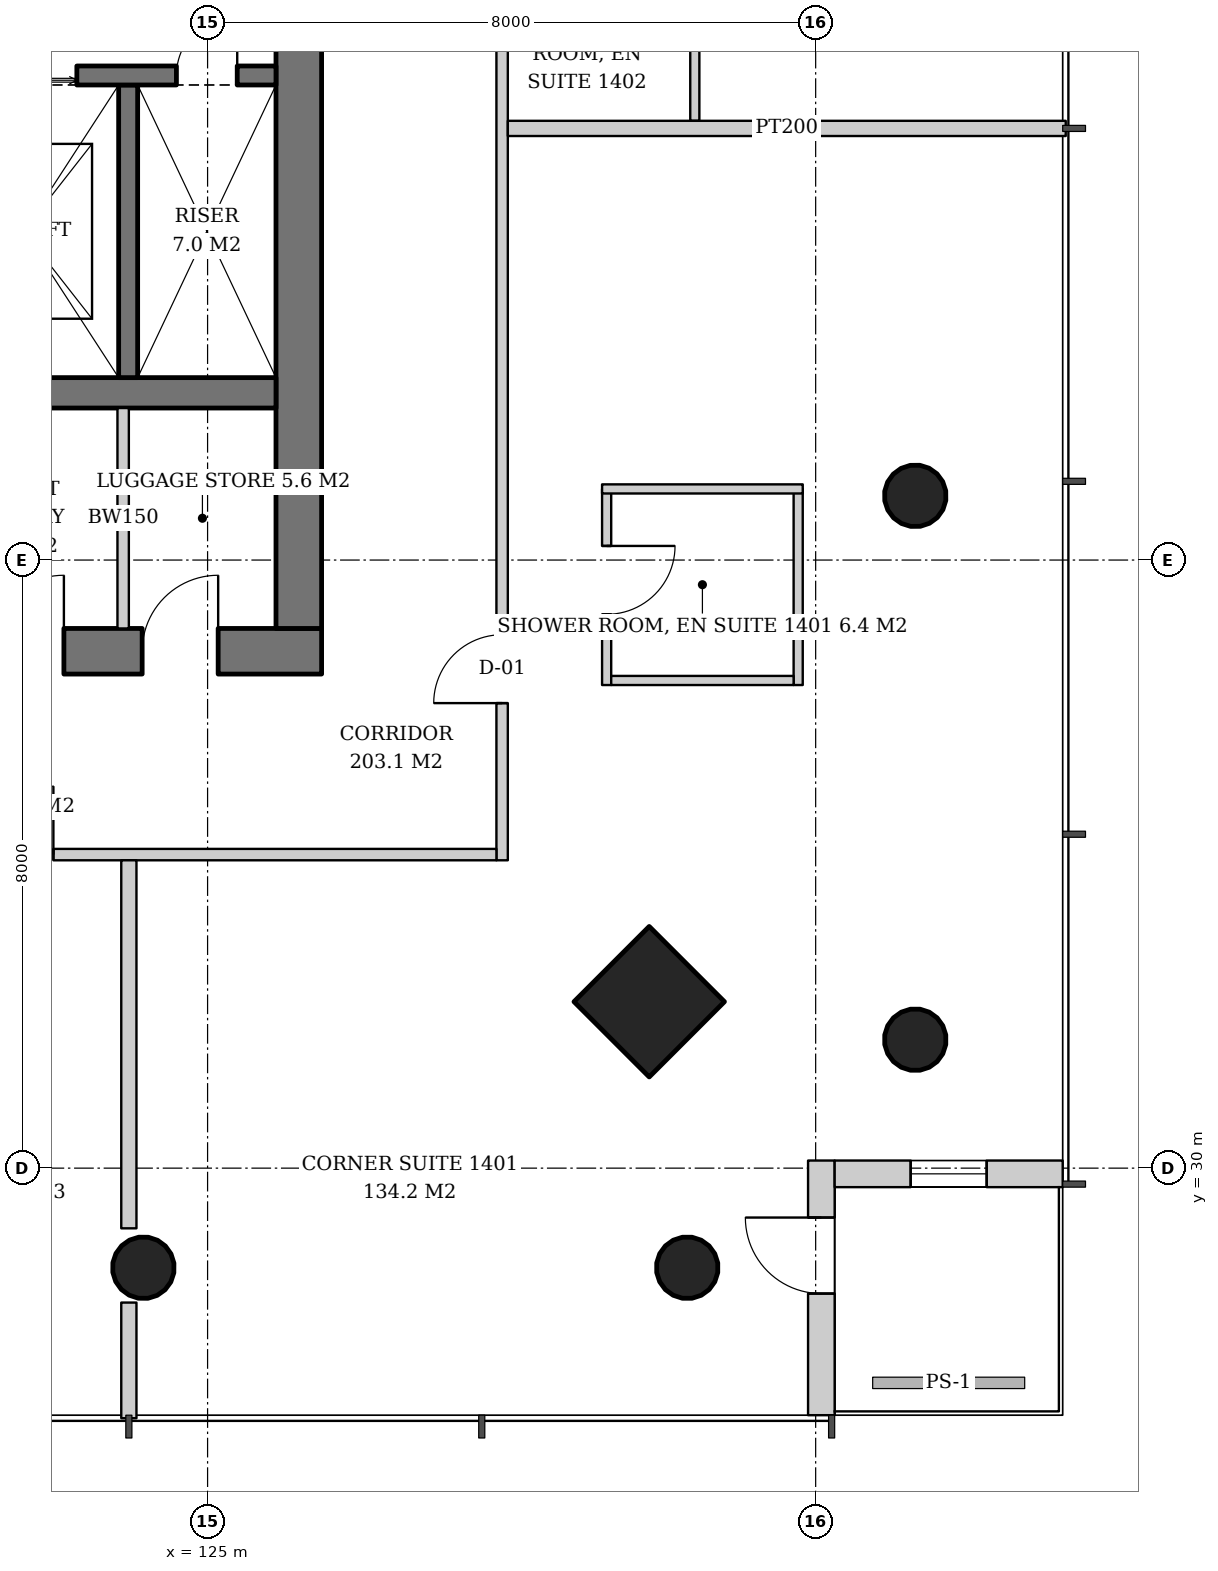
"""IFC4 building model, lengths in metres.
Left out: names, types, materials, properties, quantities, classifications, styles, units other than length and angle.
Written with IfcOpenShell. Run it as: python <this file> out.ifc"""

import sys

from ifc_helpers import new_model, si_unit, direction, frame, frame_2d, origin, origin_2d, place, context, subcontext, project, spatial, rectangle, hollow_circle, extrude, element, fill, save


model = new_model("IFC4")
c1 = context("Model", 3, precision=1e-05, world=origin(), true_north=direction((0.0, 1.0)))
c2 = subcontext(c1, "Body", "Model", "MODEL_VIEW")
j1 = project(units=[si_unit("LENGTHUNIT", "METRE"), si_unit("PLANEANGLEUNIT", "RADIAN")], contexts=[c1])
p1 = place(None, origin())
s1 = spatial("IfcSite", under=j1, at=p1, CompositionType="ELEMENT")
p2 = place(p1, origin())
s2 = spatial("IfcBuilding", under=s1, at=p2, CompositionType="ELEMENT")
p3 = place(p2, frame((0.0, 0.0, 59.0)))
s3 = spatial("IfcBuildingStorey", under=s2, at=p3, CompositionType="ELEMENT", Elevation=59.0)
p4 = place(p3, frame((134.362, 31.638, 0.0), z_axis=(-0.043029647111, 0.043029647111, 0.998146732169), x_axis=(-0.707106781187, -0.707106781187, 0.0)))
e1 = element("IfcColumn", 1, at=p4, inside=s3, PredefinedType="COLUMN", context=c2, shape_type="SweptSolid", body=[
    extrude(hollow_circle(Radius=0.406, WallThickness=0.03, at=origin_2d()), origin(), (0.0, 0.0, 1.0), 3.807),
])
p5 = place(p3, frame((134.362, 38.819, 0.0), z_axis=(-0.043059525333, 0.021561848751, 0.998839808957), x_axis=(-0.44774654769, -0.894160516368, 0.0)))
e2 = element("IfcColumn", 2, at=p5, inside=s3, PredefinedType="COLUMN", context=c2, shape_type="SweptSolid", body=[
    extrude(hollow_circle(Radius=0.406, WallThickness=0.03, at=origin_2d()), origin(), (0.0, 0.0, 1.0), 3.804),
])
p6 = place(p3, frame((130.862, 32.138, 0.0), z_axis=(-0.043029647111, 0.043029647111, 0.998146732169), x_axis=(-0.707106781187, -0.707106781187, 0.0)))
e3 = element("IfcColumn", 3, at=p6, inside=s3, PredefinedType="COLUMN", context=c2, shape_type="SweptSolid", body=[
    extrude(rectangle(XDim=1.4, YDim=1.4, at=origin_2d()), origin(), (0.0, 0.0, 1.0), 3.807),
])
p7 = place(p3, frame((131.362, 28.638, 0.0), z_axis=(-0.043029647111, 0.043029647111, 0.998146732169), x_axis=(-0.707106781187, -0.707106781187, 0.0)))
e4 = element("IfcColumn", 4, at=p7, inside=s3, PredefinedType="COLUMN", context=c2, shape_type="SweptSolid", body=[
    extrude(hollow_circle(Radius=0.406, WallThickness=0.03, at=origin_2d()), origin(), (0.0, 0.0, 1.0), 3.807),
])
p8 = place(p3, frame((124.181, 28.638, 0.0), z_axis=(-0.021561848751, 0.043059525333, 0.998839808957), x_axis=(-0.894160516368, -0.44774654769, 0.0)))
e5 = element("IfcColumn", 5, at=p8, inside=s3, PredefinedType="COLUMN", context=c2, shape_type="SweptSolid", body=[
    extrude(hollow_circle(Radius=0.406, WallThickness=0.03, at=origin_2d()), origin(), (0.0, 0.0, 1.0), 3.804),
])
p9 = place(p3, frame((107.5, 36.8, 0.0), z_axis=(0.0, 0.0, 1.0), x_axis=(1.0, 0.0, 0.0)))
e6 = element("IfcWall", 6, at=p9, inside=s3, PredefinedType="SHEAR", context=c2, shape_type="SweptSolid", body=[
    extrude(rectangle(XDim=19.0, YDim=0.6, at=frame_2d((9.5, 0.0))), origin(), (0.0, 0.0, 1.0), 3.8),
])
p10 = place(p9, frame((3.9, 0.0, 0.0)))
e7 = element("IfcOpeningElement", 7, at=p10, cuts=e6, PredefinedType="OPENING", context=c2, shape_type="SweptSolid", body=[
    extrude(rectangle(XDim=1.0, YDim=2.1, at=frame_2d((0.5, 1.05))), frame((0.0, 0.31, 0.0), z_axis=(0.0, -1.0, 0.0), x_axis=(1.0, 0.0, 0.0)), (0.0, 0.0, 1.0), 0.62),
])
p11 = place(p9, frame((14.61, 0.0, 0.0)))
e8 = element("IfcOpeningElement", 8, at=p11, cuts=e6, PredefinedType="OPENING", context=c2, shape_type="SweptSolid", body=[
    extrude(rectangle(XDim=1.0, YDim=2.1, at=frame_2d((0.5, 1.05))), frame((0.0, 0.31, 0.0), z_axis=(0.0, -1.0, 0.0), x_axis=(1.0, 0.0, 0.0)), (0.0, 0.0, 1.0), 0.62),
])
p12 = place(p9, frame((16.639, 0.0, 0.0)))
e9 = element("IfcOpeningElement", 9, at=p12, cuts=e6, PredefinedType="OPENING", context=c2, shape_type="SweptSolid", body=[
    extrude(rectangle(XDim=1.0, YDim=2.1, at=frame_2d((0.5, 1.05))), frame((0.0, 0.31, 0.0), z_axis=(0.0, -1.0, 0.0), x_axis=(1.0, 0.0, 0.0)), (0.0, 0.0, 1.0), 0.62),
])
p13 = place(p3, frame((126.2, 37.1, 0.0), z_axis=(0.0, 0.0, 1.0), x_axis=(0.0, 1.0, 0.0)))
e10 = element("IfcWall", 10, at=p13, inside=s3, PredefinedType="SHEAR", context=c2, shape_type="SweptSolid", body=[
    extrude(rectangle(XDim=17.8, YDim=0.6, at=frame_2d((8.9, 0.0))), origin(), (0.0, 0.0, 1.0), 3.8),
])
p14 = place(p13, frame((8.0, 0.0, 0.0)))
e11 = element("IfcOpeningElement", 11, at=p14, cuts=e10, PredefinedType="OPENING", context=c2, shape_type="SweptSolid", body=[
    extrude(rectangle(XDim=1.8, YDim=2.4, at=frame_2d((0.9, 1.2))), frame((0.0, 0.31, 0.0), z_axis=(0.0, -1.0, 0.0), x_axis=(1.0, 0.0, 0.0)), (0.0, 0.0, 1.0), 0.62),
])
p15 = place(p3, frame((108.1, 40.2, 0.0), z_axis=(0.0, 0.0, 1.0), x_axis=(1.0, 0.0, 0.0)))
e12 = element("IfcWall", 12, at=p15, inside=s3, PredefinedType="SHEAR", context=c2, shape_type="SweptSolid", body=[
    extrude(rectangle(XDim=17.8, YDim=0.4, at=frame_2d((8.9, 0.0))), origin(), (0.0, 0.0, 1.0), 3.8),
])
p16 = place(p3, frame((133.075, 26.75, 0.0), z_axis=(0.0, 0.0, 1.0), x_axis=(0.0, 1.0, 0.0)))
e13 = element("IfcWall", 13, at=p16, inside=s3, PredefinedType="SOLIDWALL", context=c2, shape_type="SweptSolid", body=[
    extrude(rectangle(XDim=3.35, YDim=0.35, at=frame_2d((1.675, 0.0))), origin(), (0.0, 0.0, 1.0), 3.6),
])
p17 = place(p16, frame((1.6, 0.0, 0.0)))
e14 = element("IfcOpeningElement", 14, at=p17, cuts=e13, PredefinedType="OPENING", context=c2, shape_type="SweptSolid", body=[
    extrude(rectangle(XDim=1.0, YDim=2.4, at=frame_2d((0.5, 1.2))), frame((0.0, 0.185, 0.0), z_axis=(0.0, -1.0, 0.0), x_axis=(1.0, 0.0, 0.0)), (0.0, 0.0, 1.0), 0.37),
])
p18 = place(p3, frame((133.25, 29.925, 0.0), z_axis=(0.0, 0.0, 1.0), x_axis=(1.0, 0.0, 0.0)))
e15 = element("IfcWall", 15, at=p18, inside=s3, PredefinedType="SOLIDWALL", context=c2, shape_type="SweptSolid", body=[
    extrude(rectangle(XDim=3.0, YDim=0.35, at=frame_2d((1.5, 0.0))), origin(), (0.0, 0.0, 1.0), 3.6),
])
p19 = place(p18, frame((1.0, 0.0, 0.9)))
e16 = element("IfcOpeningElement", 16, at=p19, cuts=e15, PredefinedType="OPENING", context=c2, shape_type="SweptSolid", body=[
    extrude(rectangle(XDim=1.0, YDim=2.4, at=frame_2d((0.5, 1.2))), frame((0.0, 0.185, 0.0), z_axis=(0.0, -1.0, 0.0), x_axis=(1.0, 0.0, 0.0)), (0.0, 0.0, 1.0), 0.37),
])
p20 = place(p3, frame((123.955, 44.25, 0.0), z_axis=(0.0, 0.0, 1.0), x_axis=(0.0, -1.0, 0.0)))
e17 = element("IfcWall", 17, at=p20, inside=s3, PredefinedType="SHEAR", context=c2, shape_type="SweptSolid", body=[
    extrude(rectangle(XDim=3.85, YDim=0.25, at=frame_2d((1.925, 0.0))), origin(), (0.0, 0.0, 1.0), 3.8),
])
p21 = place(p3, frame((121.33, 44.375, 0.0), z_axis=(0.0, 0.0, 1.0), x_axis=(1.0, 0.0, 0.0)))
e18 = element("IfcWall", 18, at=p21, inside=s3, PredefinedType="SHEAR", context=c2, shape_type="SweptSolid", body=[
    extrude(rectangle(XDim=4.57, YDim=0.25, at=frame_2d((2.285, 0.0))), origin(), (0.0, 0.0, 1.0), 3.8),
])
p22 = place(p21, frame((0.55, 0.0, 0.0)))
e19 = element("IfcOpeningElement", 19, at=p22, cuts=e18, PredefinedType="OPENING", context=c2, shape_type="SweptSolid", body=[
    extrude(rectangle(XDim=1.4, YDim=2.4, at=frame_2d((0.7, 1.2))), frame((0.0, 0.135, 0.0), z_axis=(0.0, -1.0, 0.0), x_axis=(1.0, 0.0, 0.0)), (0.0, 0.0, 1.0), 0.27),
])
p23 = place(p21, frame((3.26, 0.0, 0.0)))
e20 = element("IfcOpeningElement", 20, at=p23, cuts=e18, PredefinedType="OPENING", context=c2, shape_type="SweptSolid", body=[
    extrude(rectangle(XDim=0.8, YDim=2.0, at=frame_2d((0.4, 1.0))), frame((0.0, 0.135, 0.0), z_axis=(0.0, -1.0, 0.0), x_axis=(1.0, 0.0, 0.0)), (0.0, 0.0, 1.0), 0.27),
])
p24 = place(p3, frame((123.889, 37.1, 0.0), z_axis=(0.0, 0.0, 1.0), x_axis=(0.0, 1.0, 0.0)))
e21 = element("IfcWall", 21, at=p24, inside=s3, PredefinedType="SOLIDWALL", context=c2, shape_type="SweptSolid", body=[
    extrude(rectangle(XDim=2.9, YDim=0.15, at=frame_2d((1.45, 0.0))), origin(), (0.0, 0.0, 1.0), 3.6),
])
p25 = place(p3, frame((130.25, 38.936, 0.0), z_axis=(0.0, 0.0, 1.0), x_axis=(0.0, -1.0, 0.0)))
e22 = element("IfcWall", 22, at=p25, inside=s3, PredefinedType="PARTITIONING", context=c2, shape_type="SweptSolid", body=[
    extrude(rectangle(XDim=2.58, YDim=0.12, at=frame_2d((1.29, 0.0))), origin(), (0.0, 0.0, 1.0), 2.8),
])
p26 = place(p25, frame((0.75, 0.0, 0.0)))
e23 = element("IfcOpeningElement", 23, at=p26, cuts=e22, PredefinedType="OPENING", context=c2, shape_type="SweptSolid", body=[
    extrude(rectangle(XDim=0.9, YDim=2.1, at=frame_2d((0.45, 1.05))), frame((0.0, 0.07, 0.0), z_axis=(0.0, -1.0, 0.0), x_axis=(1.0, 0.0, 0.0)), (0.0, 0.0, 1.0), 0.14),
])
p27 = place(p3, frame((132.77, 38.936, 0.0), z_axis=(0.0, 0.0, 1.0), x_axis=(0.0, -1.0, 0.0)))
e24 = element("IfcWall", 24, at=p27, inside=s3, PredefinedType="PARTITIONING", context=c2, shape_type="SweptSolid", body=[
    extrude(rectangle(XDim=2.58, YDim=0.12, at=frame_2d((1.29, 0.0))), origin(), (0.0, 0.0, 1.0), 2.8),
])
p28 = place(p3, frame((130.31, 36.416, 0.0), z_axis=(0.0, 0.0, 1.0), x_axis=(1.0, 0.0, 0.0)))
e25 = element("IfcWall", 25, at=p28, inside=s3, PredefinedType="PARTITIONING", context=c2, shape_type="SweptSolid", body=[
    extrude(rectangle(XDim=2.4, YDim=0.12, at=frame_2d((1.2, 0.0))), origin(), (0.0, 0.0, 1.0), 3.6),
])
p29 = place(p3, frame((130.19, 38.936, 0.0), z_axis=(0.0, 0.0, 1.0), x_axis=(1.0, 0.0, 0.0)))
e26 = element("IfcWall", 26, at=p29, inside=s3, PredefinedType="PARTITIONING", context=c2, shape_type="SweptSolid", body=[
    extrude(rectangle(XDim=2.64, YDim=0.12, at=frame_2d((1.32, 0.0))), origin(), (0.0, 0.0, 1.0), 3.6),
])
p30 = place(p3, frame((131.41, 43.779, 0.0), z_axis=(0.0, 0.0, 1.0), x_axis=(0.0, 1.0, 0.0)))
e27 = element("IfcWall", 27, at=p30, inside=s3, PredefinedType="PARTITIONING", context=c2, shape_type="SweptSolid", body=[
    extrude(rectangle(XDim=2.42, YDim=0.12, at=frame_2d((1.21, 0.0))), origin(), (0.0, 0.0, 1.0), 2.847),
])
p31 = place(p3, frame((128.875, 34.05, 0.0), z_axis=(0.0, 0.0, 1.0), x_axis=(0.0, 1.0, 0.0)))
e28 = element("IfcWall", 28, at=p31, inside=s3, PredefinedType="PARTITIONING", context=c2, shape_type="SweptSolid", body=[
    extrude(rectangle(XDim=23.75, YDim=0.15, at=frame_2d((11.875, 0.0))), origin(), (0.0, 0.0, 1.0), 2.8),
])
p32 = place(p31, frame((2.068, 0.0, 0.0)))
e29 = element("IfcOpeningElement", 29, at=p32, cuts=e28, PredefinedType="OPENING", context=c2, shape_type="SweptSolid", body=[
    extrude(rectangle(XDim=0.9, YDim=2.1, at=frame_2d((0.45, 1.05))), frame((0.0, 0.085, 0.0), z_axis=(0.0, -1.0, 0.0), x_axis=(1.0, 0.0, 0.0)), (0.0, 0.0, 1.0), 0.17),
])
p33 = place(p31, frame((12.379, 0.0, 0.0)))
e30 = element("IfcOpeningElement", 30, at=p33, cuts=e28, PredefinedType="OPENING", context=c2, shape_type="SweptSolid", body=[
    extrude(rectangle(XDim=0.9, YDim=2.1, at=frame_2d((0.45, 1.05))), frame((0.0, 0.085, 0.0), z_axis=(0.0, -1.0, 0.0), x_axis=(1.0, 0.0, 0.0)), (0.0, 0.0, 1.0), 0.17),
])
p34 = place(p31, frame((15.264, 0.0, 0.0)))
e31 = element("IfcOpeningElement", 31, at=p34, cuts=e28, PredefinedType="OPENING", context=c2, shape_type="SweptSolid", body=[
    extrude(rectangle(XDim=0.9, YDim=2.1, at=frame_2d((0.45, 1.05))), frame((0.0, 0.085, 0.0), z_axis=(0.0, -1.0, 0.0), x_axis=(1.0, 0.0, 0.0)), (0.0, 0.0, 1.0), 0.17),
])
p35 = place(p3, frame((128.95, 43.678, 0.0), z_axis=(0.0, 0.0, 1.0), x_axis=(1.0, 0.0, 0.0)))
e32 = element("IfcWall", 32, at=p35, inside=s3, PredefinedType="PARTITIONING", context=c2, shape_type="SweptSolid", body=[
    extrude(rectangle(XDim=7.34, YDim=0.2, at=frame_2d((3.67, 0.0))), origin(), (0.0, 0.0, 1.0), 3.05),
])
p36 = place(p3, frame((105.05, 34.125, 0.0), z_axis=(0.0, 0.0, 1.0), x_axis=(1.0, 0.0, 0.0)))
e33 = element("IfcWall", 33, at=p36, inside=s3, PredefinedType="PARTITIONING", context=c2, shape_type="SweptSolid", body=[
    extrude(rectangle(XDim=23.75, YDim=0.15, at=frame_2d((11.875, 0.0))), origin(), (0.0, 0.0, 1.0), 2.8),
])
p37 = place(p36, frame((2.068, 0.0, 0.0)))
e34 = element("IfcOpeningElement", 34, at=p37, cuts=e33, PredefinedType="OPENING", context=c2, shape_type="SweptSolid", body=[
    extrude(rectangle(XDim=0.9, YDim=2.1, at=frame_2d((0.45, 1.05))), frame((0.0, 0.085, 0.0), z_axis=(0.0, -1.0, 0.0), x_axis=(1.0, 0.0, 0.0)), (0.0, 0.0, 1.0), 0.17),
])
p38 = place(p36, frame((10.621, 0.0, 0.0)))
e35 = element("IfcOpeningElement", 35, at=p38, cuts=e33, PredefinedType="OPENING", context=c2, shape_type="SweptSolid", body=[
    extrude(rectangle(XDim=0.9, YDim=2.1, at=frame_2d((0.45, 1.05))), frame((0.0, 0.085, 0.0), z_axis=(0.0, -1.0, 0.0), x_axis=(1.0, 0.0, 0.0)), (0.0, 0.0, 1.0), 0.17),
])
p39 = place(p36, frame((17.021, 0.0, 0.0)))
e36 = element("IfcOpeningElement", 36, at=p39, cuts=e33, PredefinedType="OPENING", context=c2, shape_type="SweptSolid", body=[
    extrude(rectangle(XDim=0.9, YDim=2.1, at=frame_2d((0.45, 1.05))), frame((0.0, 0.085, 0.0), z_axis=(0.0, -1.0, 0.0), x_axis=(1.0, 0.0, 0.0)), (0.0, 0.0, 1.0), 0.17),
])
p40 = place(p3, frame((123.964, 34.05, 0.0), z_axis=(0.0, 0.0, 1.0), x_axis=(0.0, -1.0, 0.0)))
e37 = element("IfcWall", 37, at=p40, inside=s3, PredefinedType="PARTITIONING", context=c2, shape_type="SweptSolid", body=[
    extrude(rectangle(XDim=4.842, YDim=0.2, at=frame_2d((2.421, 0.0))), origin(), (0.0, 0.0, 1.0), 3.6),
])
p41 = place(p3, frame((123.964, 28.231, 0.0), z_axis=(0.0, 0.0, 1.0), x_axis=(0.0, -1.0, 0.0)))
e38 = element("IfcWall", 38, at=p41, inside=s3, PredefinedType="PARTITIONING", context=c2, shape_type="SweptSolid", body=[
    extrude(rectangle(XDim=1.521, YDim=0.2, at=frame_2d((0.761, 0.0))), origin(), (0.0, 0.0, 1.0), 3.6),
])
p42 = place(p17, origin())
e39 = element("IfcDoor", 39, at=p42, inside=s3, OperationType="SINGLE_SWING_RIGHT", PredefinedType="DOOR", context=c2, shape_type="SweptSolid", body=[
    extrude(rectangle(XDim=1.0, YDim=2.4, at=frame_2d((0.5, 1.2))), frame((0.0, 0.025, 0.0), z_axis=(0.0, -1.0, 0.0), x_axis=(1.0, 0.0, 0.0)), (0.0, 0.0, 1.0), 0.05),
])
fill(e14, e39)
p43 = place(p19, origin())
e40 = element("IfcWindow", 40, at=p43, inside=s3, PartitioningType="SINGLE_PANEL", PredefinedType="WINDOW", context=c2, shape_type="SweptSolid", body=[
    extrude(rectangle(XDim=1.0, YDim=2.4, at=frame_2d((0.5, 1.2))), frame((0.0, 0.03, 0.0), z_axis=(0.0, -1.0, 0.0), x_axis=(1.0, 0.0, 0.0)), (0.0, 0.0, 1.0), 0.06),
])
fill(e16, e40)
p44 = place(p22, origin())
e41 = element("IfcDoor", 41, at=p44, inside=s3, OperationType="DOUBLE_DOOR_SLIDING", PredefinedType="DOOR", context=c2, shape_type="SweptSolid", body=[
    extrude(rectangle(XDim=1.4, YDim=2.4, at=frame_2d((0.7, 1.2))), frame((0.0, 0.025, 0.0), z_axis=(0.0, -1.0, 0.0), x_axis=(1.0, 0.0, 0.0)), (0.0, 0.0, 1.0), 0.05),
])
fill(e19, e41)
p45 = place(p23, origin())
e42 = element("IfcDoor", 42, at=p45, inside=s3, OperationType="SINGLE_SWING_RIGHT", PredefinedType="DOOR", context=c2, shape_type="SweptSolid", body=[
    extrude(rectangle(XDim=0.8, YDim=2.0, at=frame_2d((0.4, 1.0))), frame((0.0, 0.025, 0.0), z_axis=(0.0, -1.0, 0.0), x_axis=(1.0, 0.0, 0.0)), (0.0, 0.0, 1.0), 0.05),
])
fill(e20, e42)
p46 = place(p11, origin())
e43 = element("IfcDoor", 43, at=p46, inside=s3, OperationType="SINGLE_SWING_RIGHT", PredefinedType="DOOR", context=c2, shape_type="SweptSolid", body=[
    extrude(rectangle(XDim=1.0, YDim=2.1, at=frame_2d((0.5, 1.05))), frame((0.0, 0.29, 0.0), z_axis=(0.0, -1.0, 0.0), x_axis=(1.0, 0.0, 0.0)), (0.0, 0.0, 1.0), 0.05),
])
fill(e8, e43)
p47 = place(p12, origin())
e44 = element("IfcDoor", 44, at=p47, inside=s3, OperationType="SINGLE_SWING_RIGHT", PredefinedType="DOOR", context=c2, shape_type="SweptSolid", body=[
    extrude(rectangle(XDim=1.0, YDim=2.1, at=frame_2d((0.5, 1.05))), frame((0.0, 0.29, 0.0), z_axis=(0.0, -1.0, 0.0), x_axis=(1.0, 0.0, 0.0)), (0.0, 0.0, 1.0), 0.05),
])
fill(e9, e44)
p48 = place(p26, origin())
e45 = element("IfcDoor", 45, at=p48, inside=s3, OperationType="SINGLE_SWING_LEFT", PredefinedType="DOOR", context=c2, shape_type="SweptSolid", body=[
    extrude(rectangle(XDim=0.9, YDim=2.1, at=frame_2d((0.45, 1.05))), frame((0.0, 0.025, 0.0), z_axis=(0.0, -1.0, 0.0), x_axis=(1.0, 0.0, 0.0)), (0.0, 0.0, 1.0), 0.05),
])
fill(e23, e45)
p49 = place(p32, origin())
e46 = element("IfcDoor", 46, at=p49, inside=s3, OperationType="SINGLE_SWING_LEFT", PredefinedType="DOOR", context=c2, shape_type="SweptSolid", body=[
    extrude(rectangle(XDim=0.9, YDim=2.1, at=frame_2d((0.45, 1.05))), frame((0.0, 0.025, 0.0), z_axis=(0.0, -1.0, 0.0), x_axis=(1.0, 0.0, 0.0)), (0.0, 0.0, 1.0), 0.05),
])
fill(e29, e46)
p50 = place(p39, origin())
e47 = element("IfcDoor", 47, at=p50, inside=s3, OperationType="SINGLE_SWING_RIGHT", PredefinedType="DOOR", context=c2, shape_type="SweptSolid", body=[
    extrude(rectangle(XDim=0.9, YDim=2.1, at=frame_2d((0.45, 1.05))), frame((0.0, 0.025, 0.0), z_axis=(0.0, -1.0, 0.0), x_axis=(1.0, 0.0, 0.0)), (0.0, 0.0, 1.0), 0.05),
])
fill(e36, e47)
save(model, sys.argv[1])
